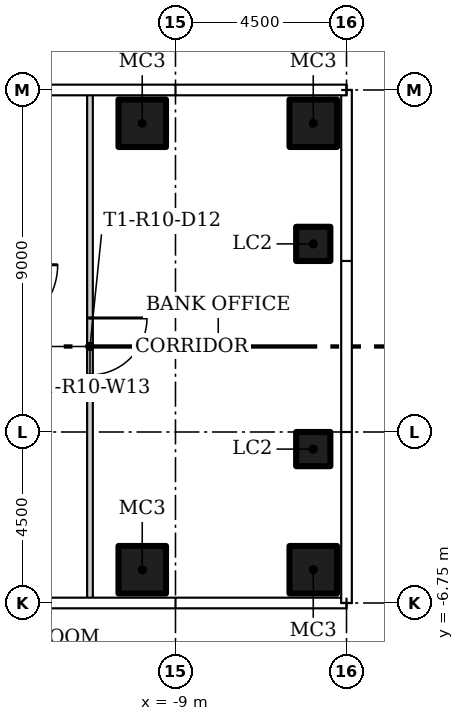
"""IFC4 building model, lengths in metres.
Left out: names, types, materials, properties, quantities, classifications, styles, units other than length and angle.
Written with IfcOpenShell. Run it as: python <this file> out.ifc"""

import sys

from ifc_helpers import new_model, si_unit, direction, frame, frame_2d, origin, origin_2d, place, context, subcontext, project, spatial, rectangle, hollow_rectangle, extrude, element, fill, save


model = new_model("IFC4")
c1 = context("Model", 3, precision=1e-05, world=origin(), true_north=direction((0.0, 1.0)))
c2 = subcontext(c1, "Body", "Model", "MODEL_VIEW")
j1 = project(units=[si_unit("LENGTHUNIT", "METRE"), si_unit("PLANEANGLEUNIT", "RADIAN")], contexts=[c1])
p1 = place(None, origin())
s1 = spatial("IfcSite", under=j1, at=p1, CompositionType="ELEMENT")
p2 = place(p1, origin())
s2 = spatial("IfcBuilding", under=s1, at=p2, CompositionType="ELEMENT")
p3 = place(p2, frame((0.0, 0.0, 105.3)))
s3 = spatial("IfcBuildingStorey", under=s2, at=p3, CompositionType="ELEMENT", Elevation=105.3)
for number, where in (
    (1, (-9.875, -5.875, 0.0)),
    (2, (-5.375, -5.875, 0.0)),
    (3, (-9.875, 5.875, 0.0)),
    (4, (-5.375, 5.875, 0.0)),
):
    element("IfcColumn", number, at=place(p3, frame(where)), inside=s3, PredefinedType="COLUMN", context=c2, shape_type="SweptSolid", body=[
        extrude(hollow_rectangle(XDim=1.25, YDim=1.25, WallThickness=0.05, at=origin_2d()), origin(), (0.0, 0.0, 1.0), 3.55),
    ])
for number, where in (
    (5, (-5.375, -2.7, 0.0)),
    (6, (-5.375, 2.7, 0.0)),
):
    element("IfcColumn", number, at=place(p3, frame(where)), inside=s3, PredefinedType="COLUMN", context=c2, shape_type="SweptSolid", body=[
        extrude(hollow_rectangle(XDim=0.9, YDim=0.9, WallThickness=0.036, at=origin_2d()), origin(), (0.0, 0.0, 1.0), 3.55),
    ])
p4 = place(p3, frame((-11.25, 6.655, 0.0), z_axis=(0.0, 0.0, 1.0), x_axis=(0.0, -1.0, 0.0)))
e7 = element("IfcWall", 7, at=p4, inside=s3, PredefinedType="PARTITIONING", context=c2, shape_type="SweptSolid", body=[
    extrude(rectangle(XDim=13.31, YDim=0.15, at=frame_2d((6.655, 0.0))), origin(), (0.0, 0.0, 1.0), 3.55),
])
p5 = place(p4, frame((5.905, 0.0, 0.0)))
e8 = element("IfcOpeningElement", 8, at=p5, cuts=e7, PredefinedType="OPENING", context=c2, shape_type="SweptSolid", body=[
    extrude(rectangle(XDim=1.5, YDim=2.1, at=frame_2d((0.75, 1.05))), frame((0.0, 0.085, 0.0), z_axis=(0.0, -1.0, 0.0), x_axis=(1.0, 0.0, 0.0)), (0.0, 0.0, 1.0), 0.17),
])
p6 = place(p5, origin())
e9 = element("IfcDoor", 9, at=p6, inside=s3, OperationType="DOUBLE_DOOR_SINGLE_SWING", PredefinedType="DOOR", context=c2, shape_type="SweptSolid", body=[
    extrude(rectangle(XDim=1.5, YDim=2.1, at=frame_2d((0.75, 1.05))), frame((0.0, 0.025, 0.0), z_axis=(0.0, -1.0, 0.0), x_axis=(1.0, 0.0, 0.0)), (0.0, 0.0, 1.0), 0.05),
])
fill(e8, e9)
save(model, sys.argv[1])
